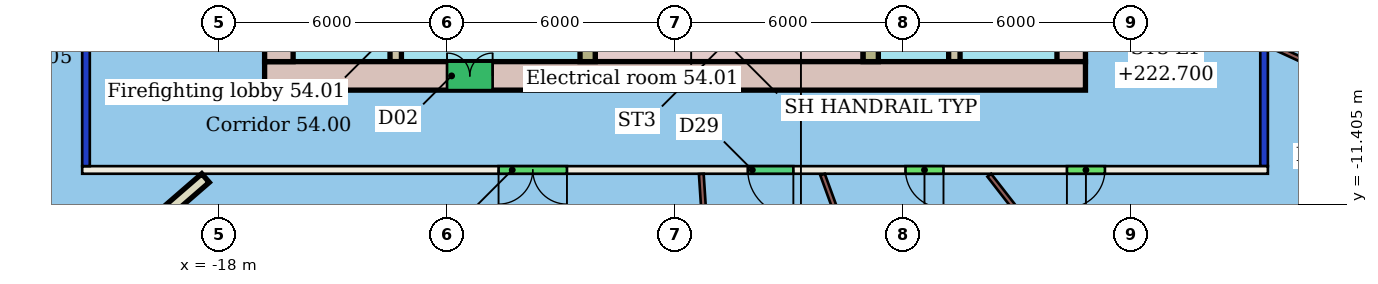
"""IFC4 building model, lengths in metres.
Left out: names, types, materials, properties, quantities, classifications, styles, units other than length and angle.
Written with IfcOpenShell. Run it as: python <this file> out.ifc"""

import sys

from ifc_helpers import new_model, si_unit, direction, frame, frame_2d, origin, place, context, subcontext, project, spatial, rectangle, extrude, element, fill, save


model = new_model("IFC4")
c1 = context("Model", 3, precision=1e-05, world=origin(), true_north=direction((0.0, 1.0)))
c2 = subcontext(c1, "Body", "Model", "MODEL_VIEW")
j1 = project(units=[si_unit("LENGTHUNIT", "METRE"), si_unit("PLANEANGLEUNIT", "RADIAN")], contexts=[c1])
p1 = place(None, origin())
s1 = spatial("IfcSite", under=j1, at=p1, CompositionType="ELEMENT")
p2 = place(p1, origin())
s2 = spatial("IfcBuilding", under=s1, at=p2, CompositionType="ELEMENT")
p3 = place(p2, frame((0.0, 0.0, 220.9)))
s3 = spatial("IfcBuildingStorey", under=s2, at=p3, CompositionType="ELEMENT", Elevation=220.9)
p4 = place(p3, frame((9.6, -10.5, 0.0), z_axis=(0.0, 0.0, 1.0), x_axis=(-1.0, 0.0, 0.0)))
e1 = element("IfcWall", 1, at=p4, inside=s3, PredefinedType="PARTITIONING", context=c2, shape_type="SweptSolid", body=[
    extrude(rectangle(XDim=31.2, YDim=0.2, at=frame_2d((15.6, 0.0))), origin(), (0.0, 0.0, 1.0), 3.45),
])
p5 = place(p4, frame((18.444, 0.0, 0.0)))
e2 = element("IfcOpeningElement", 2, at=p5, cuts=e1, PredefinedType="OPENING", context=c2, shape_type="SweptSolid", body=[
    extrude(rectangle(XDim=1.8, YDim=2.1, at=frame_2d((0.9, 1.05))), frame((0.0, 0.11, 0.0), z_axis=(0.0, -1.0, 0.0), x_axis=(1.0, 0.0, 0.0)), (0.0, 0.0, 1.0), 0.22),
])
p6 = place(p4, frame((12.487, 0.0, 0.0)))
e3 = element("IfcOpeningElement", 3, at=p6, cuts=e1, PredefinedType="OPENING", context=c2, shape_type="SweptSolid", body=[
    extrude(rectangle(XDim=1.2, YDim=2.4, at=frame_2d((0.6, 1.2))), frame((0.0, 0.11, 0.0), z_axis=(0.0, -1.0, 0.0), x_axis=(1.0, 0.0, 0.0)), (0.0, 0.0, 1.0), 0.22),
])
p7 = place(p4, frame((8.536, 0.0, 0.0)))
e4 = element("IfcOpeningElement", 4, at=p7, cuts=e1, PredefinedType="OPENING", context=c2, shape_type="SweptSolid", body=[
    extrude(rectangle(XDim=1.0, YDim=2.4, at=frame_2d((0.5, 1.2))), frame((0.0, 0.11, 0.0), z_axis=(0.0, -1.0, 0.0), x_axis=(1.0, 0.0, 0.0)), (0.0, 0.0, 1.0), 0.22),
])
p8 = place(p4, frame((4.288, 0.0, 0.0)))
e5 = element("IfcOpeningElement", 5, at=p8, cuts=e1, PredefinedType="OPENING", context=c2, shape_type="SweptSolid", body=[
    extrude(rectangle(XDim=1.0, YDim=2.4, at=frame_2d((0.5, 1.2))), frame((0.0, 0.11, 0.0), z_axis=(0.0, -1.0, 0.0), x_axis=(1.0, 0.0, 0.0)), (0.0, 0.0, 1.0), 0.22),
])
p9 = place(p3, frame((-21.5, -10.4, 0.0), z_axis=(0.0, 0.0, 1.0), x_axis=(0.0, 1.0, 0.0)))
e6 = element("IfcWall", 6, at=p9, inside=s3, PredefinedType="PARTITIONING", context=c2, shape_type="SweptSolid", body=[
    extrude(rectangle(XDim=20.8, YDim=0.2, at=frame_2d((10.4, 0.0))), origin(), (0.0, 0.0, 1.0), 3.05),
])
p10 = place(p9, frame((13.413, 0.0, 0.0)))
e7 = element("IfcOpeningElement", 7, at=p10, cuts=e6, PredefinedType="OPENING", context=c2, shape_type="SweptSolid", body=[
    extrude(rectangle(XDim=1.0, YDim=2.4, at=frame_2d((0.5, 1.2))), frame((0.0, 0.11, 0.0), z_axis=(0.0, -1.0, 0.0), x_axis=(1.0, 0.0, 0.0)), (0.0, 0.0, 1.0), 0.22),
])
p11 = place(p9, frame((5.693, 0.0, 0.0)))
e8 = element("IfcOpeningElement", 8, at=p11, cuts=e6, PredefinedType="OPENING", context=c2, shape_type="SweptSolid", body=[
    extrude(rectangle(XDim=1.8, YDim=2.4, at=frame_2d((0.9, 1.2))), frame((0.0, 0.11, 0.0), z_axis=(0.0, -1.0, 0.0), x_axis=(1.0, 0.0, 0.0)), (0.0, 0.0, 1.0), 0.22),
])
p12 = place(p3, frame((9.5, 10.4, 0.0), z_axis=(0.0, 0.0, 1.0), x_axis=(0.0, -1.0, 0.0)))
e9 = element("IfcWall", 9, at=p12, inside=s3, PredefinedType="PARTITIONING", context=c2, shape_type="SweptSolid", body=[
    extrude(rectangle(XDim=20.8, YDim=0.2, at=frame_2d((10.4, 0.0))), origin(), (0.0, 0.0, 1.0), 3.05),
])
p13 = place(p12, frame((14.609, 0.0, 0.0)))
e10 = element("IfcOpeningElement", 10, at=p13, cuts=e9, PredefinedType="OPENING", context=c2, shape_type="SweptSolid", body=[
    extrude(rectangle(XDim=0.9, YDim=2.1, at=frame_2d((0.45, 1.05))), frame((0.0, 0.11, 0.0), z_axis=(0.0, -1.0, 0.0), x_axis=(1.0, 0.0, 0.0)), (0.0, 0.0, 1.0), 0.22),
])
p14 = place(p12, frame((6.585, 0.0, 0.0)))
e11 = element("IfcOpeningElement", 11, at=p14, cuts=e9, PredefinedType="OPENING", context=c2, shape_type="SweptSolid", body=[
    extrude(rectangle(XDim=1.5, YDim=2.1, at=frame_2d((0.75, 1.05))), frame((0.0, 0.11, 0.0), z_axis=(0.0, -1.0, 0.0), x_axis=(1.0, 0.0, 0.0)), (0.0, 0.0, 1.0), 0.22),
])
p15 = place(p3, frame((-26.146, -17.469, 0.0), z_axis=(0.0, 0.0, 1.0), x_axis=(0.755515634714, 0.655130617284, 0.0)))
e12 = element("IfcWall", 12, at=p15, inside=s3, PredefinedType="PARTITIONING", context=c2, shape_type="SweptSolid", body=[
    extrude(rectangle(XDim=10.312, YDim=0.3, at=frame_2d((5.156, 0.0))), origin(), (0.0, 0.0, 1.0), 3.45),
])
p16 = place(p3, frame((-4.455, -23.727, 0.0), z_axis=(0.0, 0.0, 1.0), x_axis=(-0.064995948595, 0.997885527837, 0.0)))
e13 = element("IfcWall", 13, at=p16, inside=s3, PredefinedType="PARTITIONING", context=c2, shape_type="SweptSolid", body=[
    extrude(rectangle(XDim=13.151, YDim=0.125, at=frame_2d((6.575, 0.0))), origin(), (0.0, 0.0, 1.0), 3.45),
])
p17 = place(p3, frame((1.765, -21.249, 0.0), z_axis=(0.0, 0.0, 1.0), x_axis=(-0.343220407619, 0.939254891813, 0.0)))
e14 = element("IfcWall", 14, at=p17, inside=s3, PredefinedType="PARTITIONING", context=c2, shape_type="SweptSolid", body=[
    extrude(rectangle(XDim=11.315, YDim=0.125, at=frame_2d((5.657, 0.0))), origin(), (0.0, 0.0, 1.0), 3.45),
])
p18 = place(p3, frame((7.457, -17.314, 0.0), z_axis=(0.0, 0.0, 1.0), x_axis=(-0.613674696521, 0.789558969837, 0.0)))
e15 = element("IfcWall", 15, at=p18, inside=s3, PredefinedType="PARTITIONING", context=c2, shape_type="SweptSolid", body=[
    extrude(rectangle(XDim=8.455, YDim=0.125, at=frame_2d((4.228, 0.0))), origin(), (0.0, 0.0, 1.0), 3.45),
])
p19 = place(p3, frame((14.161, -9.292, 0.0), z_axis=(0.0, 0.0, 1.0), x_axis=(-0.908192487976, 0.4185527503, 0.0)))
e16 = element("IfcWall", 16, at=p19, inside=s3, PredefinedType="PARTITIONING", context=c2, shape_type="SweptSolid", body=[
    extrude(rectangle(XDim=4.994, YDim=0.125, at=frame_2d((2.497, 0.0))), origin(), (0.0, 0.0, 1.0), 3.45),
])
p20 = place(p3, frame((-16.8, -8.025, 0.0), z_axis=(0.0, 0.0, 1.0), x_axis=(1.0, 0.0, 0.0)))
e17 = element("IfcWall", 17, at=p20, inside=s3, PredefinedType="SHEAR", context=c2, shape_type="SweptSolid", body=[
    extrude(rectangle(XDim=21.6, YDim=0.75, at=frame_2d((10.8, 0.0))), origin(), (0.0, 0.0, 1.0), 3.3),
])
p21 = place(p20, frame((4.8, 0.0, 0.0)))
e18 = element("IfcOpeningElement", 18, at=p21, cuts=e17, PredefinedType="OPENING", context=c2, shape_type="SweptSolid", body=[
    extrude(rectangle(XDim=1.2, YDim=2.1, at=frame_2d((0.6, 1.05))), frame((0.0, 0.385, 0.0), z_axis=(0.0, -1.0, 0.0), x_axis=(1.0, 0.0, 0.0)), (0.0, 0.0, 1.0), 0.77),
])
p22 = place(p3, frame((-16.425, 7.65, 0.0), z_axis=(0.0, 0.0, 1.0), x_axis=(0.0, -1.0, 0.0)))
e19 = element("IfcWall", 19, at=p22, inside=s3, PredefinedType="SHEAR", context=c2, shape_type="SweptSolid", body=[
    extrude(rectangle(XDim=15.3, YDim=0.75, at=frame_2d((7.65, 0.0))), origin(), (0.0, 0.0, 1.0), 3.3),
])
p23 = place(p22, frame((11.25, 0.0, 0.0)))
e20 = element("IfcOpeningElement", 20, at=p23, cuts=e19, PredefinedType="OPENING", context=c2, shape_type="SweptSolid", body=[
    extrude(rectangle(XDim=1.2, YDim=2.1, at=frame_2d((0.6, 1.05))), frame((0.0, 0.385, 0.0), z_axis=(0.0, -1.0, 0.0), x_axis=(1.0, 0.0, 0.0)), (0.0, 0.0, 1.0), 0.77),
])
p24 = place(p22, frame((2.85, 0.0, 0.0)))
e21 = element("IfcOpeningElement", 21, at=p24, cuts=e19, PredefinedType="OPENING", context=c2, shape_type="SweptSolid", body=[
    extrude(rectangle(XDim=1.2, YDim=2.1, at=frame_2d((0.6, 1.05))), frame((0.0, 0.385, 0.0), z_axis=(0.0, -1.0, 0.0), x_axis=(1.0, 0.0, 0.0)), (0.0, 0.0, 1.0), 0.77),
])
p25 = place(p3, frame((4.425, -7.65, 0.0), z_axis=(0.0, 0.0, 1.0), x_axis=(0.0, 1.0, 0.0)))
e22 = element("IfcWall", 22, at=p25, inside=s3, PredefinedType="SHEAR", context=c2, shape_type="SweptSolid", body=[
    extrude(rectangle(XDim=15.3, YDim=0.75, at=frame_2d((7.65, 0.0))), origin(), (0.0, 0.0, 1.0), 3.3),
])
p26 = place(p25, frame((2.85, 0.0, 0.0)))
e23 = element("IfcOpeningElement", 23, at=p26, cuts=e22, PredefinedType="OPENING", context=c2, shape_type="SweptSolid", body=[
    extrude(rectangle(XDim=1.2, YDim=2.1, at=frame_2d((0.6, 1.05))), frame((0.0, 0.385, 0.0), z_axis=(0.0, -1.0, 0.0), x_axis=(1.0, 0.0, 0.0)), (0.0, 0.0, 1.0), 0.77),
])
p27 = place(p25, frame((11.25, 0.0, 0.0)))
e24 = element("IfcOpeningElement", 24, at=p27, cuts=e22, PredefinedType="OPENING", context=c2, shape_type="SweptSolid", body=[
    extrude(rectangle(XDim=1.2, YDim=2.1, at=frame_2d((0.6, 1.05))), frame((0.0, 0.385, 0.0), z_axis=(0.0, -1.0, 0.0), x_axis=(1.0, 0.0, 0.0)), (0.0, 0.0, 1.0), 0.77),
])
p28 = place(p3, frame((-13.35, 7.65, 0.0), z_axis=(0.0, 0.0, 1.0), x_axis=(0.0, -1.0, 0.0)))
e25 = element("IfcWall", 25, at=p28, inside=s3, PredefinedType="SHEAR", context=c2, shape_type="SweptSolid", body=[
    extrude(rectangle(XDim=15.3, YDim=0.3, at=frame_2d((7.65, 0.0))), origin(), (0.0, 0.0, 1.0), 3.3),
])
p29 = place(p28, frame((6.9, 0.0, 0.0)))
e26 = element("IfcOpeningElement", 26, at=p29, cuts=e25, PredefinedType="OPENING", context=c2, shape_type="SweptSolid", body=[
    extrude(rectangle(XDim=1.5, YDim=2.1, at=frame_2d((0.75, 1.05))), frame((0.0, 0.16, 0.0), z_axis=(0.0, -1.0, 0.0), x_axis=(1.0, 0.0, 0.0)), (0.0, 0.0, 1.0), 0.32),
])
p30 = place(p3, frame((1.35, -7.65, 0.0), z_axis=(0.0, 0.0, 1.0), x_axis=(0.0, 1.0, 0.0)))
e27 = element("IfcWall", 27, at=p30, inside=s3, PredefinedType="SHEAR", context=c2, shape_type="SweptSolid", body=[
    extrude(rectangle(XDim=15.3, YDim=0.3, at=frame_2d((7.65, 0.0))), origin(), (0.0, 0.0, 1.0), 3.3),
])
p31 = place(p30, frame((1.56, 0.0, 0.0)))
e28 = element("IfcOpeningElement", 28, at=p31, cuts=e27, PredefinedType="OPENING", context=c2, shape_type="SweptSolid", body=[
    extrude(rectangle(XDim=1.0, YDim=2.1, at=frame_2d((0.5, 1.05))), frame((0.0, 0.16, 0.0), z_axis=(0.0, -1.0, 0.0), x_axis=(1.0, 0.0, 0.0)), (0.0, 0.0, 1.0), 0.32),
])
p32 = place(p30, frame((6.9, 0.0, 0.0)))
e29 = element("IfcOpeningElement", 29, at=p32, cuts=e27, PredefinedType="OPENING", context=c2, shape_type="SweptSolid", body=[
    extrude(rectangle(XDim=1.5, YDim=2.1, at=frame_2d((0.75, 1.05))), frame((0.0, 0.16, 0.0), z_axis=(0.0, -1.0, 0.0), x_axis=(1.0, 0.0, 0.0)), (0.0, 0.0, 1.0), 0.32),
])
p33 = place(p3, frame((-8.3, -3.88, 0.0), z_axis=(0.0, 0.0, 1.0), x_axis=(0.0, -1.0, 0.0)))
e30 = element("IfcWall", 30, at=p33, inside=s3, PredefinedType="SHEAR", context=c2, shape_type="SweptSolid", body=[
    extrude(rectangle(XDim=3.77, YDim=0.4, at=frame_2d((1.885, 0.0))), origin(), (0.0, 0.0, 1.0), 3.3),
])
p34 = place(p33, frame((1.11, 0.0, 0.0)))
e31 = element("IfcOpeningElement", 31, at=p34, cuts=e30, PredefinedType="OPENING", context=c2, shape_type="SweptSolid", body=[
    extrude(rectangle(XDim=1.2, YDim=2.1, at=frame_2d((0.6, 1.05))), frame((0.0, 0.21, 0.0), z_axis=(0.0, -1.0, 0.0), x_axis=(1.0, 0.0, 0.0)), (0.0, 0.0, 1.0), 0.42),
])
p35 = place(p3, frame((-0.85, -3.88, 0.0), z_axis=(0.0, 0.0, 1.0), x_axis=(0.0, -1.0, 0.0)))
e32 = element("IfcWall", 32, at=p35, inside=s3, PredefinedType="SHEAR", context=c2, shape_type="SweptSolid", body=[
    extrude(rectangle(XDim=3.77, YDim=0.4, at=frame_2d((1.885, 0.0))), origin(), (0.0, 0.0, 1.0), 3.3),
])
p36 = place(p3, frame((-8.1, -7.475, 0.0), z_axis=(0.0, 0.0, 1.0), x_axis=(1.0, 0.0, 0.0)))
e33 = element("IfcWall", 33, at=p36, inside=s3, PredefinedType="SHEAR", context=c2, shape_type="SweptSolid", body=[
    extrude(rectangle(XDim=7.05, YDim=0.35, at=frame_2d((3.525, 0.0))), origin(), (0.0, 0.0, 1.0), 3.3),
])
p37 = place(p5, origin())
e34 = element("IfcDoor", 34, at=p37, inside=s3, OperationType="DOUBLE_DOOR_SINGLE_SWING", PredefinedType="DOOR", context=c2, shape_type="SweptSolid", body=[
    extrude(rectangle(XDim=1.8, YDim=2.1, at=frame_2d((0.9, 1.05))), frame((0.0, 0.025, 0.0), z_axis=(0.0, -1.0, 0.0), x_axis=(1.0, 0.0, 0.0)), (0.0, 0.0, 1.0), 0.05),
])
fill(e2, e34)
p38 = place(p6, origin())
e35 = element("IfcDoor", 35, at=p38, inside=s3, OperationType="SINGLE_SWING_LEFT", PredefinedType="DOOR", context=c2, shape_type="SweptSolid", body=[
    extrude(rectangle(XDim=1.2, YDim=2.4, at=frame_2d((0.6, 1.2))), frame((0.0, 0.025, 0.0), z_axis=(0.0, -1.0, 0.0), x_axis=(1.0, 0.0, 0.0)), (0.0, 0.0, 1.0), 0.05),
])
fill(e3, e35)
p39 = place(p7, origin())
e36 = element("IfcDoor", 36, at=p39, inside=s3, OperationType="SINGLE_SWING_LEFT", PredefinedType="DOOR", context=c2, shape_type="SweptSolid", body=[
    extrude(rectangle(XDim=1.0, YDim=2.4, at=frame_2d((0.5, 1.2))), frame((0.0, 0.025, 0.0), z_axis=(0.0, -1.0, 0.0), x_axis=(1.0, 0.0, 0.0)), (0.0, 0.0, 1.0), 0.05),
])
fill(e4, e36)
p40 = place(p8, origin())
e37 = element("IfcDoor", 37, at=p40, inside=s3, OperationType="SINGLE_SWING_RIGHT", PredefinedType="DOOR", context=c2, shape_type="SweptSolid", body=[
    extrude(rectangle(XDim=1.0, YDim=2.4, at=frame_2d((0.5, 1.2))), frame((0.0, 0.025, 0.0), z_axis=(0.0, -1.0, 0.0), x_axis=(1.0, 0.0, 0.0)), (0.0, 0.0, 1.0), 0.05),
])
fill(e5, e37)
p41 = place(p21, origin())
e38 = element("IfcDoor", 38, at=p41, inside=s3, OperationType="DOUBLE_DOOR_SINGLE_SWING", PredefinedType="NOTDEFINED", context=c2, shape_type="SweptSolid", body=[
    extrude(rectangle(XDim=1.2, YDim=2.1, at=frame_2d((0.6, 1.05))), frame((0.0, 0.025, 0.0), z_axis=(0.0, -1.0, 0.0), x_axis=(1.0, 0.0, 0.0)), (0.0, 0.0, 1.0), 0.05),
])
fill(e18, e38)
save(model, sys.argv[1])
